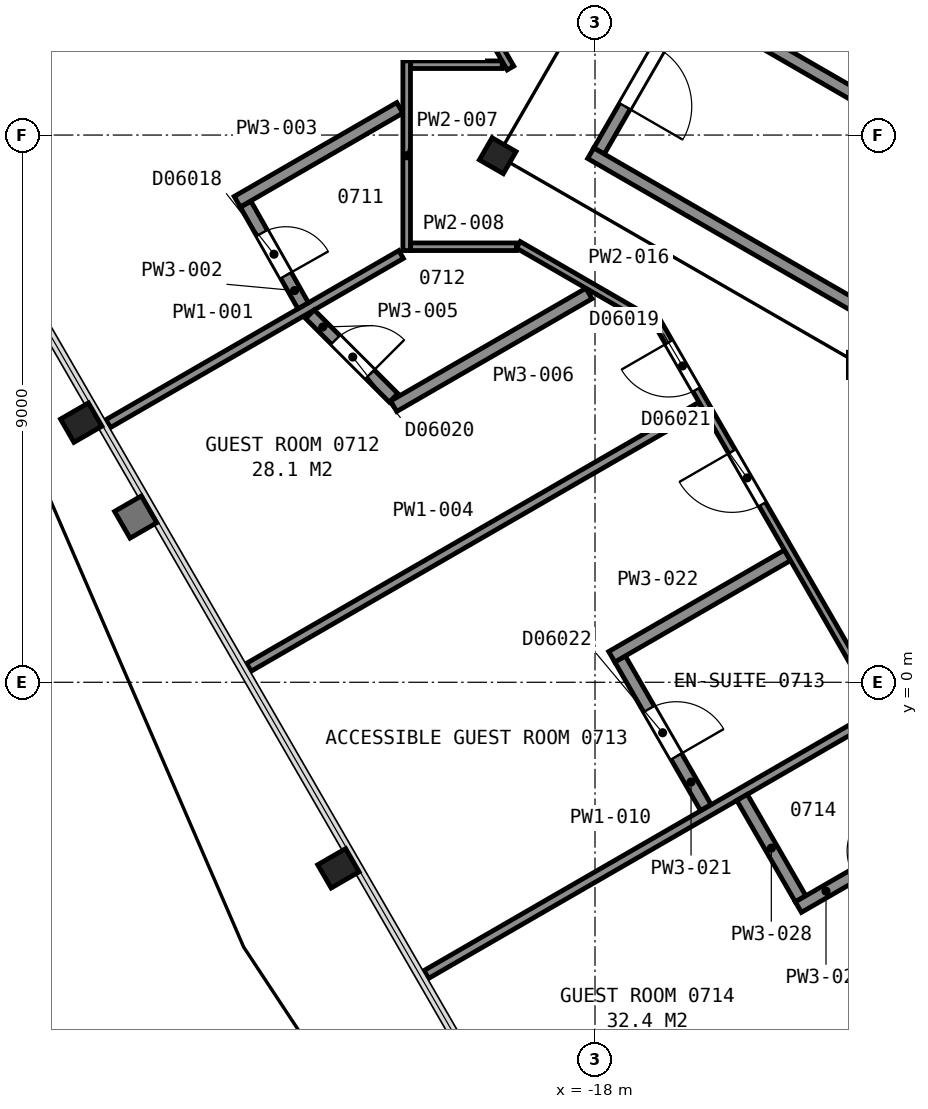
"""IFC4 building model, lengths in metres.
Left out: names, types, materials, properties, quantities, classifications, styles, units other than length and angle.
Written with IfcOpenShell. Run it as: python <this file> out.ifc"""

import sys

from ifc_helpers import new_model, si_unit, direction, frame, frame_2d, origin, origin_2d, place, context, subcontext, project, spatial, rectangle, i_section, extrude, element, fill, save


model = new_model("IFC4")
c1 = context("Model", 3, precision=1e-05, world=origin(), true_north=direction((0.0, 1.0)))
c2 = subcontext(c1, "Body", "Model", "MODEL_VIEW")
j1 = project(units=[si_unit("LENGTHUNIT", "METRE"), si_unit("PLANEANGLEUNIT", "RADIAN")], contexts=[c1])
p1 = place(None, origin())
s1 = spatial("IfcSite", under=j1, at=p1, CompositionType="ELEMENT")
p2 = place(p1, origin())
s2 = spatial("IfcBuilding", under=s1, at=p2, CompositionType="ELEMENT")
p3 = place(p2, frame((0.0, 0.0, 40.4)))
s3 = spatial("IfcBuildingStorey", under=s2, at=p3, CompositionType="ELEMENT", Elevation=40.4)
for number, where, z_axis, x_axis in (
    (1, (-26.45, 4.27, 0.0), (0.0, 0.0, 1.0), (-0.5, 0.866, 0.0)),
    (2, (-22.22, -3.06, 0.0), (0.0, 0.0, 1.0), (-0.5, 0.866, 0.0)),
):
    element("IfcColumn", number, at=place(p3, frame(where, z_axis=z_axis, x_axis=x_axis)), inside=s3, PredefinedType="COLUMN", context=c2, shape_type="SweptSolid", body=[
        extrude(i_section(OverallWidth=0.442, OverallDepth=0.531, WebThickness=0.066, FlangeThickness=0.106, FilletRadius=0.015, at=origin_2d()), origin(), (0.0, 0.0, 1.0), 3.575),
    ])
p4 = place(p3, frame((-19.6, 8.66, 0.0), z_axis=(0.0, 0.0, 1.0), x_axis=(0.5, 0.866025403784, 0.0)))
e3 = element("IfcColumn", 3, at=p4, inside=s3, PredefinedType="COLUMN", context=c2, shape_type="SweptSolid", body=[
    extrude(i_section(OverallWidth=0.419, OverallDepth=0.455, WebThickness=0.042, FlangeThickness=0.068, FilletRadius=0.015, at=origin_2d()), origin(), (0.0, 0.0, 1.0), 3.6),
])
p5 = place(p3, frame((-16.534, 11.162, 0.0), z_axis=(0.0, 0.0, 1.0), x_axis=(-0.49998411664, -0.866034573852, 0.0)))
e4 = element("IfcWall", 4, at=p5, inside=s3, PredefinedType="PARTITIONING", context=c2, shape_type="SweptSolid", body=[
    extrude(rectangle(XDim=2.8, YDim=0.2, at=frame_2d((1.4, 0.0))), origin(), (0.0, 0.0, 1.0), 3.35),
])
p6 = place(p5, frame((0.85, 0.0, 0.0)))
e5 = element("IfcOpeningElement", 5, at=p6, cuts=e4, PredefinedType="OPENING", context=c2, shape_type="SweptSolid", body=[
    extrude(rectangle(XDim=1.1, YDim=2.1, at=frame_2d((0.55, 1.05))), frame((0.0, 0.11, 0.0), z_axis=(0.0, -1.0, 0.0), x_axis=(1.0, 0.0, 0.0)), (0.0, 0.0, 1.0), 0.22),
])
for number, where, z_axis, x_axis in (
    (6, (-7.678, 2.701, 0.0), (0.0, 0.0, 1.0), (-0.866, 0.5, 0.0)),
    (7, (-6.178, 5.299, 0.0), (0.0, 0.0, 1.0), (-0.866, 0.5, 0.0)),
):
    element("IfcWall", number, at=place(p3, frame(where, z_axis=z_axis, x_axis=x_axis)), inside=s3, PredefinedType="PARTITIONING", context=c2, shape_type="SweptSolid", body=[
        extrude(rectangle(XDim=12.0, YDim=0.2, at=frame_2d((6.0, 0.0))), origin(), (0.0, 0.0, 1.0), 3.35),
    ])
p7 = place(p3, frame((-26.006, 4.254, 0.0), z_axis=(0.0, 0.0, 1.0), x_axis=(0.865981654797, 0.500075767815, 0.0)))
e8 = element("IfcWall", 8, at=p7, inside=s3, PredefinedType="PARTITIONING", context=c2, shape_type="SweptSolid", body=[
    extrude(rectangle(XDim=5.563, YDim=0.15, at=frame_2d((2.781, 0.0))), origin(), (0.0, 0.0, 1.0), 2.613),
])
p8 = place(p3, frame((-23.745, 7.863, 0.0), z_axis=(0.0, 0.0, 1.0), x_axis=(0.492970842961, -0.870045830971, 0.0)))
e9 = element("IfcWall", 9, at=p8, inside=s3, PredefinedType="PARTITIONING", context=c2, shape_type="SweptSolid", body=[
    extrude(rectangle(XDim=1.919, YDim=0.2, at=frame_2d((0.959, 0.0))), origin(), (0.0, 0.0, 1.0), 2.613),
])
p9 = place(p8, frame((0.545, 0.0, 0.0)))
e10 = element("IfcOpeningElement", 10, at=p9, cuts=e9, PredefinedType="OPENING", context=c2, shape_type="SweptSolid", body=[
    extrude(rectangle(XDim=0.8, YDim=2.1, at=frame_2d((0.4, 1.05))), frame((0.0, 0.11, 0.0), z_axis=(0.0, -1.0, 0.0), x_axis=(1.0, 0.0, 0.0)), (0.0, 0.0, 1.0), 0.22),
])
p10 = place(p3, frame((-23.884, 7.904, 0.0), z_axis=(0.0, 0.0, 1.0), x_axis=(0.866015731669, 0.500016752221, 0.0)))
e11 = element("IfcWall", 11, at=p10, inside=s3, PredefinedType="PARTITIONING", context=c2, shape_type="SweptSolid", body=[
    extrude(rectangle(XDim=3.088, YDim=0.2, at=frame_2d((1.544, 0.0))), origin(), (0.0, 0.0, 1.0), 2.613),
])
p11 = place(p3, frame((-23.693, 0.247, 0.0), z_axis=(0.0, 0.0, 1.0), x_axis=(0.866031705461, 0.499989085017, 0.0)))
e12 = element("IfcWall", 12, at=p11, inside=s3, PredefinedType="PARTITIONING", context=c2, shape_type="SweptSolid", body=[
    extrude(rectangle(XDim=8.587, YDim=0.15, at=frame_2d((4.293, 0.0))), origin(), (0.0, 0.0, 1.0), 2.613),
])
p12 = place(p3, frame((-22.688, 6.053, 0.0), z_axis=(0.0, 0.0, 1.0), x_axis=(0.707106781187, -0.707106781187, 0.0)))
e13 = element("IfcWall", 13, at=p12, inside=s3, PredefinedType="PARTITIONING", context=c2, shape_type="SweptSolid", body=[
    extrude(rectangle(XDim=1.944, YDim=0.2, at=frame_2d((0.972, 0.0))), origin(), (0.0, 0.0, 1.0), 2.613),
])
p13 = place(p12, frame((0.595, 0.0, 0.0)))
e14 = element("IfcOpeningElement", 14, at=p13, cuts=e13, PredefinedType="OPENING", context=c2, shape_type="SweptSolid", body=[
    extrude(rectangle(XDim=0.8, YDim=2.1, at=frame_2d((0.4, 1.05))), frame((0.0, 0.11, 0.0), z_axis=(0.0, -1.0, 0.0), x_axis=(1.0, 0.0, 0.0)), (0.0, 0.0, 1.0), 0.22),
])
p14 = place(p3, frame((-21.312, 4.54, 0.0), z_axis=(0.0, 0.0, 1.0), x_axis=(0.866071583234, 0.499920006315, 0.0)))
e15 = element("IfcWall", 15, at=p14, inside=s3, PredefinedType="PARTITIONING", context=c2, shape_type="SweptSolid", body=[
    extrude(rectangle(XDim=3.708, YDim=0.2, at=frame_2d((1.854, 0.0))), origin(), (0.0, 0.0, 1.0), 2.613),
])
p15 = place(p3, frame((-21.097, 7.101, 0.0), z_axis=(0.0, 0.0, 1.0), x_axis=(0.0, 1.0, 0.0)))
e16 = element("IfcWall", 16, at=p15, inside=s3, PredefinedType="PARTITIONING", context=c2, shape_type="SweptSolid", body=[
    extrude(rectangle(XDim=3.119, YDim=0.125, at=frame_2d((1.56, 0.0))), origin(), (0.0, 0.0, 1.0), 2.613),
])
p16 = place(p3, frame((-21.032, 7.163, 0.0), z_axis=(0.0, 0.0, 1.0), x_axis=(1.0, 0.0, 0.0)))
e17 = element("IfcWall", 17, at=p16, inside=s3, PredefinedType="PARTITIONING", context=c2, shape_type="SweptSolid", body=[
    extrude(rectangle(XDim=1.741, YDim=0.125, at=frame_2d((0.871, 0.0))), origin(), (0.0, 0.0, 1.0), 2.613),
])
p17 = place(p3, frame((-21.032, 10.157, 0.0), z_axis=(0.0, 0.0, 1.0), x_axis=(1.0, 0.0, 0.0)))
e18 = element("IfcWall", 18, at=p17, inside=s3, PredefinedType="PARTITIONING", context=c2, shape_type="SweptSolid", body=[
    extrude(rectangle(XDim=1.506, YDim=0.125, at=frame_2d((0.753, 0.0))), origin(), (0.0, 0.0, 1.0), 2.613),
])
p18 = place(p3, frame((-20.775, -4.806, 0.0), z_axis=(0.0, 0.0, 1.0), x_axis=(0.865995804368, 0.50005126419, 0.0)))
e19 = element("IfcWall", 19, at=p18, inside=s3, PredefinedType="PARTITIONING", context=c2, shape_type="SweptSolid", body=[
    extrude(rectangle(XDim=8.591, YDim=0.15, at=frame_2d((4.295, 0.0))), origin(), (0.0, 0.0, 1.0), 2.613),
])
p19 = place(p3, frame((-20.293, 11.666, 0.0), z_axis=(0.0, 0.0, 1.0), x_axis=(0.500327160669, -0.865836435071, 0.0)))
e20 = element("IfcWall", 20, at=p19, inside=s3, PredefinedType="PARTITIONING", context=c2, shape_type="SweptSolid", body=[
    extrude(rectangle(XDim=1.805, YDim=0.125, at=frame_2d((0.903, 0.0))), origin(), (0.0, 0.0, 1.0), 2.613),
])
p20 = place(p3, frame((-19.26, 7.194, 0.0), z_axis=(0.0, 0.0, 1.0), x_axis=(0.865944638795, -0.50013986298, 0.0)))
e21 = element("IfcWall", 21, at=p20, inside=s3, PredefinedType="PARTITIONING", context=c2, shape_type="SweptSolid", body=[
    extrude(rectangle(XDim=2.599, YDim=0.125, at=frame_2d((1.299, 0.0))), origin(), (0.0, 0.0, 1.0), 2.613),
])
p21 = place(p3, frame((-18.462, -8.813, 0.0), z_axis=(0.0, 0.0, 1.0), x_axis=(0.866029425019, 0.499993034952, 0.0)))
e22 = element("IfcWall", 22, at=p21, inside=s3, PredefinedType="PARTITIONING", context=c2, shape_type="SweptSolid", body=[
    extrude(rectangle(XDim=8.591, YDim=0.15, at=frame_2d((4.296, 0.0))), origin(), (0.0, 0.0, 1.0), 2.613),
])
p22 = place(p3, frame((-17.588, 0.382, 0.0), z_axis=(0.0, 0.0, 1.0), x_axis=(0.499984757355, -0.866034203951, 0.0)))
e23 = element("IfcWall", 23, at=p22, inside=s3, PredefinedType="PARTITIONING", context=c2, shape_type="SweptSolid", body=[
    extrude(rectangle(XDim=2.82, YDim=0.2, at=frame_2d((1.41, 0.0))), origin(), (0.0, 0.0, 1.0), 2.613),
])
p23 = place(p22, frame((0.95, 0.0, 0.0)))
e24 = element("IfcOpeningElement", 24, at=p23, cuts=e23, PredefinedType="OPENING", context=c2, shape_type="SweptSolid", body=[
    extrude(rectangle(XDim=0.9, YDim=2.1, at=frame_2d((0.45, 1.05))), frame((0.0, 0.11, 0.0), z_axis=(0.0, -1.0, 0.0), x_axis=(1.0, 0.0, 0.0)), (0.0, 0.0, 1.0), 0.22),
])
p24 = place(p3, frame((-17.725, 0.419, 0.0), z_axis=(0.0, 0.0, 1.0), x_axis=(0.865960142641, 0.500113018585, 0.0)))
e25 = element("IfcWall", 25, at=p24, inside=s3, PredefinedType="PARTITIONING", context=c2, shape_type="SweptSolid", body=[
    extrude(rectangle(XDim=3.337, YDim=0.2, at=frame_2d((1.668, 0.0))), origin(), (0.0, 0.0, 1.0), 2.613),
])
p25 = place(p3, frame((-3.766, -16.958, 0.0), z_axis=(0.0, 0.0, 1.0), x_axis=(-0.500024758804, 0.866011108811, 0.0)))
e26 = element("IfcWall", 26, at=p25, inside=s3, PredefinedType="PARTITIONING", context=c2, shape_type="SweptSolid", body=[
    extrude(rectangle(XDim=26.402, YDim=0.125, at=frame_2d((13.201, 0.0))), origin(), (0.0, 0.0, 1.0), 2.613),
])
p26 = place(p25, frame((25.139, 0.0, 0.0)))
e27 = element("IfcOpeningElement", 27, at=p26, cuts=e26, PredefinedType="OPENING", context=c2, shape_type="SweptSolid", body=[
    extrude(rectangle(XDim=0.9, YDim=2.1, at=frame_2d((0.45, 1.05))), frame((0.0, 0.073, 0.0), z_axis=(0.0, -1.0, 0.0), x_axis=(1.0, 0.0, 0.0)), (0.0, 0.0, 1.0), 0.145),
])
p27 = place(p25, frame((22.963, 0.0, 0.0)))
e28 = element("IfcOpeningElement", 28, at=p27, cuts=e26, PredefinedType="OPENING", context=c2, shape_type="SweptSolid", body=[
    extrude(rectangle(XDim=1.0, YDim=2.1, at=frame_2d((0.5, 1.05))), frame((0.0, 0.073, 0.0), z_axis=(0.0, -1.0, 0.0), x_axis=(1.0, 0.0, 0.0)), (0.0, 0.0, 1.0), 0.145),
])
p28 = place(p25, frame((15.228, 0.0, 0.0)))
e29 = element("IfcOpeningElement", 29, at=p28, cuts=e26, PredefinedType="OPENING", context=c2, shape_type="SweptSolid", body=[
    extrude(rectangle(XDim=0.9, YDim=2.1, at=frame_2d((0.45, 1.05))), frame((0.0, 0.073, 0.0), z_axis=(0.0, -1.0, 0.0), x_axis=(1.0, 0.0, 0.0)), (0.0, 0.0, 1.0), 0.145),
])
p29 = place(p25, frame((12.702, 0.0, 0.0)))
e30 = element("IfcOpeningElement", 30, at=p29, cuts=e26, PredefinedType="OPENING", context=c2, shape_type="SweptSolid", body=[
    extrude(rectangle(XDim=0.9, YDim=2.1, at=frame_2d((0.45, 1.05))), frame((0.0, 0.073, 0.0), z_axis=(0.0, -1.0, 0.0), x_axis=(1.0, 0.0, 0.0)), (0.0, 0.0, 1.0), 0.145),
])
p30 = place(p25, frame((5.624, 0.0, 0.0)))
e31 = element("IfcOpeningElement", 31, at=p30, cuts=e26, PredefinedType="OPENING", context=c2, shape_type="SweptSolid", body=[
    extrude(rectangle(XDim=0.9, YDim=2.1, at=frame_2d((0.45, 1.05))), frame((0.0, 0.073, 0.0), z_axis=(0.0, -1.0, 0.0), x_axis=(1.0, 0.0, 0.0)), (0.0, 0.0, 1.0), 0.145),
])
p31 = place(p25, frame((2.843, 0.0, 0.0)))
e32 = element("IfcOpeningElement", 32, at=p31, cuts=e26, PredefinedType="OPENING", context=c2, shape_type="SweptSolid", body=[
    extrude(rectangle(XDim=0.9, YDim=2.1, at=frame_2d((0.45, 1.05))), frame((0.0, 0.073, 0.0), z_axis=(0.0, -1.0, 0.0), x_axis=(1.0, 0.0, 0.0)), (0.0, 0.0, 1.0), 0.145),
])
p32 = place(p3, frame((-15.582, -1.894, 0.0), z_axis=(0.0, 0.0, 1.0), x_axis=(0.500026156197, -0.86601030197, 0.0)))
e33 = element("IfcWall", 33, at=p32, inside=s3, PredefinedType="PARTITIONING", context=c2, shape_type="SweptSolid", body=[
    extrude(rectangle(XDim=1.925, YDim=0.2, at=frame_2d((0.963, 0.0))), origin(), (0.0, 0.0, 1.0), 2.613),
])
p33 = place(p3, frame((-14.656, -3.698, 0.0), z_axis=(0.0, 0.0, 1.0), x_axis=(0.866005850709, 0.50003386539, 0.0)))
e34 = element("IfcWall", 34, at=p33, inside=s3, PredefinedType="PARTITIONING", context=c2, shape_type="SweptSolid", body=[
    extrude(rectangle(XDim=2.737, YDim=0.2, at=frame_2d((1.369, 0.0))), origin(), (0.0, 0.0, 1.0), 2.613),
])
p34 = place(p33, frame((1.05, 0.0, 0.0)))
e35 = element("IfcOpeningElement", 35, at=p34, cuts=e34, PredefinedType="OPENING", context=c2, shape_type="SweptSolid", body=[
    extrude(rectangle(XDim=0.8, YDim=2.1, at=frame_2d((0.4, 1.05))), frame((0.0, 0.11, 0.0), z_axis=(0.0, -1.0, 0.0), x_axis=(1.0, 0.0, 0.0)), (0.0, 0.0, 1.0), 0.22),
])
p35 = place(p6, origin())
e36 = element("IfcDoor", 36, at=p35, inside=s3, OperationType="SINGLE_SWING_RIGHT", PredefinedType="DOOR", context=c2, shape_type="SweptSolid", body=[
    extrude(rectangle(XDim=1.1, YDim=2.1, at=frame_2d((0.55, 1.05))), frame((0.0, 0.025, 0.0), z_axis=(0.0, -1.0, 0.0), x_axis=(1.0, 0.0, 0.0)), (0.0, 0.0, 1.0), 0.05),
])
fill(e5, e36)
p36 = place(p9, origin())
e37 = element("IfcDoor", 37, at=p36, inside=s3, OperationType="SINGLE_SWING_RIGHT", PredefinedType="DOOR", context=c2, shape_type="SweptSolid", body=[
    extrude(rectangle(XDim=0.8, YDim=2.1, at=frame_2d((0.4, 1.05))), frame((0.0, 0.025, 0.0), z_axis=(0.0, -1.0, 0.0), x_axis=(1.0, 0.0, 0.0)), (0.0, 0.0, 1.0), 0.05),
])
fill(e10, e37)
p37 = place(p13, origin())
e38 = element("IfcDoor", 38, at=p37, inside=s3, OperationType="SINGLE_SWING_RIGHT", PredefinedType="DOOR", context=c2, shape_type="SweptSolid", body=[
    extrude(rectangle(XDim=0.8, YDim=2.1, at=frame_2d((0.4, 1.05))), frame((0.0, 0.025, 0.0), z_axis=(0.0, -1.0, 0.0), x_axis=(1.0, 0.0, 0.0)), (0.0, 0.0, 1.0), 0.05),
])
fill(e14, e38)
p38 = place(p23, origin())
e39 = element("IfcDoor", 39, at=p38, inside=s3, OperationType="SINGLE_SWING_RIGHT", PredefinedType="DOOR", context=c2, shape_type="SweptSolid", body=[
    extrude(rectangle(XDim=0.9, YDim=2.1, at=frame_2d((0.45, 1.05))), frame((0.0, 0.025, 0.0), z_axis=(0.0, -1.0, 0.0), x_axis=(1.0, 0.0, 0.0)), (0.0, 0.0, 1.0), 0.05),
])
fill(e24, e39)
p39 = place(p26, origin())
e40 = element("IfcDoor", 40, at=p39, inside=s3, OperationType="SINGLE_SWING_RIGHT", PredefinedType="DOOR", context=c2, shape_type="SweptSolid", body=[
    extrude(rectangle(XDim=0.9, YDim=2.1, at=frame_2d((0.45, 1.05))), frame((0.0, 0.025, 0.0), z_axis=(0.0, -1.0, 0.0), x_axis=(1.0, 0.0, 0.0)), (0.0, 0.0, 1.0), 0.05),
])
fill(e27, e40)
p40 = place(p27, origin())
e41 = element("IfcDoor", 41, at=p40, inside=s3, OperationType="SINGLE_SWING_RIGHT", PredefinedType="DOOR", context=c2, shape_type="SweptSolid", body=[
    extrude(rectangle(XDim=1.0, YDim=2.1, at=frame_2d((0.5, 1.05))), frame((0.0, 0.025, 0.0), z_axis=(0.0, -1.0, 0.0), x_axis=(1.0, 0.0, 0.0)), (0.0, 0.0, 1.0), 0.05),
])
fill(e28, e41)
save(model, sys.argv[1])
